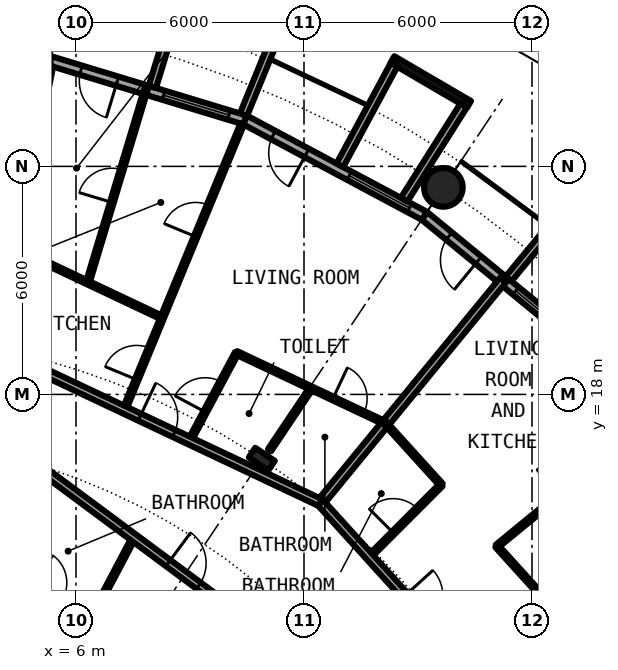
"""IFC4 building model, lengths in metres.
Left out: names, types, materials, properties, quantities, classifications, styles, units other than length and angle.
Written with IfcOpenShell. Run it as: python <this file> out.ifc"""

import sys

from ifc_helpers import new_model, si_unit, direction, frame, frame_2d, origin, origin_2d, place, context, subcontext, project, spatial, rectangle, circle, hollow_circle, i_section, extrude, element, fill, save


model = new_model("IFC4")
c1 = context("Model", 3, precision=1e-05, world=origin(), true_north=direction((0.0, 1.0)))
c2 = subcontext(c1, "Body", "Model", "MODEL_VIEW")
j1 = project(units=[si_unit("LENGTHUNIT", "METRE"), si_unit("PLANEANGLEUNIT", "RADIAN")], contexts=[c1])
p1 = place(None, origin())
s1 = spatial("IfcSite", under=j1, at=p1, CompositionType="ELEMENT")
p2 = place(p1, origin())
s2 = spatial("IfcBuilding", under=s1, at=p2, CompositionType="ELEMENT")
p3 = place(p2, frame((0.0, 0.0, 41.1)))
s3 = spatial("IfcBuildingStorey", under=s2, at=p3, CompositionType="ELEMENT", Elevation=41.1)
p4 = place(p3, frame((15.667, 23.448, 0.0), z_axis=(0.0, 0.0, 1.0), x_axis=(1.0, 0.0, 0.0)))
e1 = element("IfcColumn", 1, at=p4, inside=s3, PredefinedType="COLUMN", context=c2, shape_type="SweptSolid", body=[
    extrude(hollow_circle(Radius=0.508, WallThickness=0.05, at=origin_2d()), origin(), (0.0, 0.0, 1.0), 3.05),
])
p5 = place(p3, frame((10.889, 16.297, 0.0), z_axis=(0.0, 0.0, 1.0), x_axis=(0.55557023302, 0.831469612303, 0.0)))
e2 = element("IfcColumn", 2, at=p5, inside=s3, PredefinedType="COLUMN", context=c2, shape_type="SweptSolid", body=[
    extrude(i_section(OverallWidth=0.305, OverallDepth=0.62, WebThickness=0.021, FlangeThickness=0.04, FilletRadius=0.027, at=origin_2d()), origin(), (0.0, 0.0, 1.0), 3.05),
])
p6 = place(p3, frame((19.304, 19.304, 0.0), z_axis=(0.0, 0.0, 1.0), x_axis=(-0.773019449054, 0.634382322723, 0.0)))
e3 = element("IfcWall", 3, at=p6, inside=s3, PredefinedType="SOLIDWALL", context=c2, shape_type="SweptSolid", body=[
    extrude(rectangle(XDim=5.352, YDim=0.25, at=frame_2d((2.676, 0.0))), origin(), (0.0, 0.0, 1.0), 2.7),
])
p7 = place(p6, frame((0.441, 0.0, 0.3)))
e4 = element("IfcOpeningElement", 4, at=p7, cuts=e3, PredefinedType="OPENING", context=c2, shape_type="SweptSolid", body=[
    extrude(rectangle(XDim=1.8, YDim=2.1, at=frame_2d((0.9, 1.05))), frame((0.0, 0.135, 0.0), z_axis=(0.0, -1.0, 0.0), x_axis=(1.0, 0.0, 0.0)), (0.0, 0.0, 1.0), 0.27),
])
p8 = place(p6, frame((3.51, 0.0, 0.0)))
e5 = element("IfcOpeningElement", 5, at=p8, cuts=e3, PredefinedType="OPENING", context=c2, shape_type="SweptSolid", body=[
    extrude(rectangle(XDim=1.0, YDim=2.2, at=frame_2d((0.5, 1.1))), frame((0.0, 0.135, 0.0), z_axis=(0.0, -1.0, 0.0), x_axis=(1.0, 0.0, 0.0)), (0.0, 0.0, 1.0), 0.27),
])
p9 = place(p3, frame((17.384, 21.041, -0.03), z_axis=(0.0, 0.0, 1.0), x_axis=(0.63709551667, 0.770784861449, 0.0)))
e6 = element("IfcWall", 6, at=p9, inside=s3, PredefinedType="SOLIDWALL", context=c2, shape_type="SweptSolid", body=[
    extrude(rectangle(XDim=3.006, YDim=0.2, at=frame_2d((1.503, 0.0))), origin(), (0.0, 0.0, 1.0), 2.73),
])
p10 = place(p3, frame((15.167, 22.699, 0.0), z_axis=(0.0, 0.0, 1.0), x_axis=(-0.881915646801, 0.471407246368, 0.0)))
e7 = element("IfcWall", 7, at=p10, inside=s3, PredefinedType="SOLIDWALL", context=c2, shape_type="SweptSolid", body=[
    extrude(rectangle(XDim=5.352, YDim=0.25, at=frame_2d((2.676, 0.0))), origin(), (0.0, 0.0, 1.0), 2.7),
])
p11 = place(p10, frame((0.441, 0.0, 0.3)))
e8 = element("IfcOpeningElement", 8, at=p11, cuts=e7, PredefinedType="OPENING", context=c2, shape_type="SweptSolid", body=[
    extrude(rectangle(XDim=1.8, YDim=2.1, at=frame_2d((0.9, 1.05))), frame((0.0, 0.135, 0.0), z_axis=(0.0, -1.0, 0.0), x_axis=(1.0, 0.0, 0.0)), (0.0, 0.0, 1.0), 0.27),
])
p12 = place(p10, frame((3.51, 0.0, 0.0)))
e9 = element("IfcOpeningElement", 9, at=p12, cuts=e7, PredefinedType="OPENING", context=c2, shape_type="SweptSolid", body=[
    extrude(rectangle(XDim=1.0, YDim=2.2, at=frame_2d((0.5, 1.1))), frame((0.0, 0.135, 0.0), z_axis=(0.0, -1.0, 0.0), x_axis=(1.0, 0.0, 0.0)), (0.0, 0.0, 1.0), 0.27),
])
p13 = place(p3, frame((16.344, 25.633, -0.03), z_axis=(0.0, 0.0, 1.0), x_axis=(-0.863346521872, 0.504611517081, 0.0)))
e10 = element("IfcWall", 10, at=p13, inside=s3, PredefinedType="SOLIDWALL", context=c2, shape_type="SweptSolid", body=[
    extrude(rectangle(XDim=2.336, YDim=0.2, at=frame_2d((1.168, 0.0))), origin(), (0.0, 0.0, 1.0), 2.73),
])
p14 = place(p13, frame((0.128, 0.0, 0.33)))
e11 = element("IfcOpeningElement", 11, at=p14, cuts=e10, PredefinedType="OPENING", context=c2, shape_type="SweptSolid", body=[
    extrude(circle(Radius=1.04, at=frame_2d((1.04, 1.04))), frame((0.0, 0.11, 0.0), z_axis=(0.0, -1.0, 0.0), x_axis=(1.0, 0.0, 0.0)), (0.0, 0.0, 1.0), 0.22),
])
p15 = place(p3, frame((14.635, 23.126, -0.03), z_axis=(0.0, 0.0, 1.0), x_axis=(0.534437802731, 0.845207805816, 0.0)))
e12 = element("IfcWall", 12, at=p15, inside=s3, PredefinedType="SOLIDWALL", context=c2, shape_type="SweptSolid", body=[
    extrude(rectangle(XDim=2.932, YDim=0.2, at=frame_2d((1.466, 0.0))), origin(), (0.0, 0.0, 1.0), 2.73),
])
p16 = place(p3, frame((12.945, 24.029, -0.03), z_axis=(0.0, 0.0, 1.0), x_axis=(0.474424310775, 0.88029629861, 0.0)))
e13 = element("IfcWall", 13, at=p16, inside=s3, PredefinedType="SOLIDWALL", context=c2, shape_type="SweptSolid", body=[
    extrude(rectangle(XDim=3.006, YDim=0.2, at=frame_2d((1.503, 0.0))), origin(), (0.0, 0.0, 1.0), 2.73),
])
p17 = place(p3, frame((10.447, 25.222, 0.0), z_axis=(0.0, 0.0, 1.0), x_axis=(-0.956965678721, 0.290201119486, 0.0)))
e14 = element("IfcWall", 14, at=p17, inside=s3, PredefinedType="SOLIDWALL", context=c2, shape_type="SweptSolid", body=[
    extrude(rectangle(XDim=5.351, YDim=0.25, at=frame_2d((2.676, 0.0))), origin(), (0.0, 0.0, 1.0), 2.7),
])
p18 = place(p17, frame((0.441, 0.0, 0.3)))
e15 = element("IfcOpeningElement", 15, at=p18, cuts=e14, PredefinedType="OPENING", context=c2, shape_type="SweptSolid", body=[
    extrude(rectangle(XDim=1.8, YDim=2.1, at=frame_2d((0.9, 1.05))), frame((0.0, 0.135, 0.0), z_axis=(0.0, -1.0, 0.0), x_axis=(1.0, 0.0, 0.0)), (0.0, 0.0, 1.0), 0.27),
])
p19 = place(p17, frame((3.51, 0.0, 0.0)))
e16 = element("IfcOpeningElement", 16, at=p19, cuts=e14, PredefinedType="OPENING", context=c2, shape_type="SweptSolid", body=[
    extrude(rectangle(XDim=1.0, YDim=2.2, at=frame_2d((0.5, 1.1))), frame((0.0, 0.135, 0.0), z_axis=(0.0, -1.0, 0.0), x_axis=(1.0, 0.0, 0.0)), (0.0, 0.0, 1.0), 0.27),
])
p20 = place(p3, frame((10.409, 25.364, -0.03), z_axis=(0.0, 0.0, 1.0), x_axis=(0.379509886562, 0.925187681501, 0.0)))
e17 = element("IfcWall", 17, at=p20, inside=s3, PredefinedType="SOLIDWALL", context=c2, shape_type="SweptSolid", body=[
    extrude(rectangle(XDim=2.883, YDim=0.2, at=frame_2d((1.441, 0.0))), origin(), (0.0, 0.0, 1.0), 2.73),
])
p21 = place(p3, frame((8.009, 26.092, -0.03), z_axis=(0.0, 0.0, 1.0), x_axis=(0.293406695073, 0.955987715029, 0.0)))
e18 = element("IfcWall", 18, at=p21, inside=s3, PredefinedType="SOLIDWALL", context=c2, shape_type="SweptSolid", body=[
    extrude(rectangle(XDim=3.006, YDim=0.2, at=frame_2d((1.503, 0.0))), origin(), (0.0, 0.0, 1.0), 2.73),
])
p22 = place(p3, frame((3.885, 19.527, 0.0), z_axis=(0.0, 0.0, 1.0), x_axis=(0.19503038749, 0.980797200218, 0.0)))
e19 = element("IfcWall", 19, at=p22, inside=s3, PredefinedType="PARTITIONING", context=c2, shape_type="SweptSolid", body=[
    extrude(rectangle(XDim=7.265, YDim=0.2, at=frame_2d((3.633, 0.0))), origin(), (0.0, 0.0, 1.0), 2.7),
])
p23 = place(p3, frame((6.31, 20.945, 0.0), z_axis=(0.0, 0.0, 1.0), x_axis=(0.288484435279, 0.957484585047, 0.0)))
e20 = element("IfcWall", 20, at=p23, inside=s3, PredefinedType="PARTITIONING", context=c2, shape_type="SweptSolid", body=[
    extrude(rectangle(XDim=5.3, YDim=0.1, at=frame_2d((2.65, 0.0))), origin(), (0.0, 0.0, 1.0), 2.7),
])
p24 = place(p23, frame((2.2, 0.0, 0.0)))
e21 = element("IfcOpeningElement", 21, at=p24, cuts=e20, PredefinedType="OPENING", context=c2, shape_type="SweptSolid", body=[
    extrude(rectangle(XDim=0.9, YDim=2.3, at=frame_2d((0.45, 1.15))), frame((0.0, 0.06, 0.0), z_axis=(0.0, -1.0, 0.0), x_axis=(1.0, 0.0, 0.0)), (0.0, 0.0, 1.0), 0.12),
])
p25 = place(p3, frame((6.318, 11.96, 0.0), z_axis=(0.0, 0.0, 1.0), x_axis=(0.467001992543, 0.884256263173, 0.0)))
e22 = element("IfcWall", 22, at=p25, inside=s3, PredefinedType="PARTITIONING", context=c2, shape_type="SweptSolid", body=[
    extrude(rectangle(XDim=2.572, YDim=0.1, at=frame_2d((1.286, 0.0))), origin(), (0.0, 0.0, 1.0), 2.7),
])
p26 = place(p3, frame((7.268, 17.594, 0.0), z_axis=(0.0, 0.0, 1.0), x_axis=(0.381660983618, 0.924302382115, 0.0)))
e23 = element("IfcWall", 23, at=p26, inside=s3, PredefinedType="PARTITIONING", context=c2, shape_type="SweptSolid", body=[
    extrude(rectangle(XDim=8.138, YDim=0.1, at=frame_2d((4.069, 0.0))), origin(), (0.0, 0.0, 1.0), 2.7),
])
p27 = place(p26, frame((0.86, 0.0, 0.0)))
e24 = element("IfcOpeningElement", 24, at=p27, cuts=e23, PredefinedType="OPENING", context=c2, shape_type="SweptSolid", body=[
    extrude(rectangle(XDim=0.9, YDim=2.3, at=frame_2d((0.45, 1.15))), frame((0.0, 0.06, 0.0), z_axis=(0.0, -1.0, 0.0), x_axis=(1.0, 0.0, 0.0)), (0.0, 0.0, 1.0), 0.12),
])
p28 = place(p26, frame((4.93, 0.0, 0.0)))
e25 = element("IfcOpeningElement", 25, at=p28, cuts=e23, PredefinedType="OPENING", context=c2, shape_type="SweptSolid", body=[
    extrude(rectangle(XDim=0.9, YDim=2.3, at=frame_2d((0.45, 1.15))), frame((0.0, 0.06, 0.0), z_axis=(0.0, -1.0, 0.0), x_axis=(1.0, 0.0, 0.0)), (0.0, 0.0, 1.0), 0.12),
])
p29 = place(p3, frame((8.99, 16.78, 0.0), z_axis=(0.0, 0.0, 1.0), x_axis=(0.472216244249, 0.881482738723, 0.0)))
e26 = element("IfcWall", 26, at=p29, inside=s3, PredefinedType="PARTITIONING", context=c2, shape_type="SweptSolid", body=[
    extrude(rectangle(XDim=2.622, YDim=0.1, at=frame_2d((1.311, 0.0))), origin(), (0.0, 0.0, 1.0), 2.7),
])
p30 = place(p29, frame((0.861, 0.0, 0.0)))
e27 = element("IfcOpeningElement", 27, at=p30, cuts=e26, PredefinedType="OPENING", context=c2, shape_type="SweptSolid", body=[
    extrude(rectangle(XDim=0.9, YDim=2.3, at=frame_2d((0.45, 1.15))), frame((0.0, 0.06, 0.0), z_axis=(0.0, -1.0, 0.0), x_axis=(1.0, 0.0, 0.0)), (0.0, 0.0, 1.0), 0.12),
])
p31 = place(p3, frame((11.093, 16.533, 0.0), z_axis=(0.0, 0.0, 1.0), x_axis=(0.557134474719, 0.830422288405, 0.0)))
e28 = element("IfcWall", 28, at=p31, inside=s3, PredefinedType="PARTITIONING", context=c2, shape_type="SweptSolid", body=[
    extrude(rectangle(XDim=1.965, YDim=0.1, at=frame_2d((0.983, 0.0))), origin(), (0.0, 0.0, 1.0), 2.7),
])
p32 = place(p3, frame((12.432, 15.152, 0.0), z_axis=(0.0, 0.0, 1.0), x_axis=(0.634353152115, 0.77304338714, 0.0)))
e29 = element("IfcWall", 29, at=p32, inside=s3, PredefinedType="PARTITIONING", context=c2, shape_type="SweptSolid", body=[
    extrude(rectangle(XDim=7.576, YDim=0.2, at=frame_2d((3.788, 0.0))), origin(), (0.0, 0.0, 1.0), 2.7),
])
p33 = place(p3, frame((13.722, 13.73, 0.0), z_axis=(0.0, 0.0, 1.0), x_axis=(0.706741540154, 0.707471833659, 0.0)))
e30 = element("IfcWall", 30, at=p33, inside=s3, PredefinedType="PARTITIONING", context=c2, shape_type="SweptSolid", body=[
    extrude(rectangle(XDim=2.674, YDim=0.1, at=frame_2d((1.337, 0.0))), origin(), (0.0, 0.0, 1.0), 2.7),
])
p34 = place(p33, frame((0.887, 0.0, 0.0)))
e31 = element("IfcOpeningElement", 31, at=p34, cuts=e30, PredefinedType="OPENING", context=c2, shape_type="SweptSolid", body=[
    extrude(rectangle(XDim=0.9, YDim=2.3, at=frame_2d((0.45, 1.15))), frame((0.0, 0.06, 0.0), z_axis=(0.0, -1.0, 0.0), x_axis=(1.0, 0.0, 0.0)), (0.0, 0.0, 1.0), 0.12),
])
p35 = place(p3, frame((17.077, 14.006, 0.0), z_axis=(0.0, 0.0, 1.0), x_axis=(0.77326214499, 0.634086472908, 0.0)))
e32 = element("IfcWall", 32, at=p35, inside=s3, PredefinedType="PARTITIONING", context=c2, shape_type="SweptSolid", body=[
    extrude(rectangle(XDim=5.089, YDim=0.1, at=frame_2d((2.544, 0.0))), origin(), (0.0, 0.0, 1.0), 2.7),
])
p36 = place(p35, frame((2.094, 0.0, 0.0)))
e33 = element("IfcOpeningElement", 33, at=p36, cuts=e32, PredefinedType="OPENING", context=c2, shape_type="SweptSolid", body=[
    extrude(rectangle(XDim=0.9, YDim=2.3, at=frame_2d((0.45, 1.15))), frame((0.0, 0.06, 0.0), z_axis=(0.0, -1.0, 0.0), x_axis=(1.0, 0.0, 0.0)), (0.0, 0.0, 1.0), 0.12),
])
p37 = place(p3, frame((4.122, 13.589, 0.0), z_axis=(0.0, 0.0, 1.0), x_axis=(0.803128348509, -0.595806055542, 0.0)))
e34 = element("IfcWall", 34, at=p37, inside=s3, PredefinedType="PARTITIONING", context=c2, shape_type="SweptSolid", body=[
    extrude(rectangle(XDim=2.734, YDim=0.1, at=frame_2d((1.367, 0.0))), origin(), (0.0, 0.0, 1.0), 2.7),
])
p38 = place(p37, frame((0.917, 0.0, 0.0)))
e35 = element("IfcOpeningElement", 35, at=p38, cuts=e34, PredefinedType="OPENING", context=c2, shape_type="SweptSolid", body=[
    extrude(rectangle(XDim=0.9, YDim=2.3, at=frame_2d((0.45, 1.15))), frame((0.0, 0.06, 0.0), z_axis=(0.0, -1.0, 0.0), x_axis=(1.0, 0.0, 0.0)), (0.0, 0.0, 1.0), 0.12),
])
p39 = place(p3, frame((4.906, 16.172, 0.0), z_axis=(0.0, 0.0, 1.0), x_axis=(0.803202106898, -0.595706618626, 0.0)))
e36 = element("IfcWall", 36, at=p39, inside=s3, PredefinedType="PARTITIONING", context=c2, shape_type="SweptSolid", body=[
    extrude(rectangle(XDim=11.368, YDim=0.2, at=frame_2d((5.684, 0.0))), origin(), (0.0, 0.0, 1.0), 2.7),
])
p40 = place(p39, frame((4.38, 0.0, 0.0)))
e37 = element("IfcOpeningElement", 37, at=p40, cuts=e36, PredefinedType="OPENING", context=c2, shape_type="SweptSolid", body=[
    extrude(rectangle(XDim=1.0, YDim=2.3, at=frame_2d((0.5, 1.15))), frame((0.0, 0.11, 0.0), z_axis=(0.0, -1.0, 0.0), x_axis=(1.0, 0.0, 0.0)), (0.0, 0.0, 1.0), 0.22),
])
p41 = place(p3, frame((3.966, 19.154, 0.0), z_axis=(0.0, 0.0, 1.0), x_axis=(0.904067688688, -0.427389300603, 0.0)))
e38 = element("IfcWall", 38, at=p41, inside=s3, PredefinedType="PARTITIONING", context=c2, shape_type="SweptSolid", body=[
    extrude(rectangle(XDim=9.366, YDim=0.2, at=frame_2d((4.683, 0.0))), origin(), (0.0, 0.0, 1.0), 2.38),
])
p42 = place(p41, frame((4.104, 0.0, 0.0)))
e39 = element("IfcOpeningElement", 39, at=p42, cuts=e38, PredefinedType="OPENING", context=c2, shape_type="SweptSolid", body=[
    extrude(rectangle(XDim=1.0, YDim=2.3, at=frame_2d((0.5, 1.15))), frame((0.0, 0.11, 0.0), z_axis=(0.0, -1.0, 0.0), x_axis=(1.0, 0.0, 0.0)), (0.0, 0.0, 1.0), 0.22),
])
p43 = place(p3, frame((12.434, 15.151, 0.0), z_axis=(0.0, 0.0, 1.0), x_axis=(0.671514934772, -0.740991020444, 0.0)))
e40 = element("IfcWall", 40, at=p43, inside=s3, PredefinedType="PARTITIONING", context=c2, shape_type="SweptSolid", body=[
    extrude(rectangle(XDim=5.598, YDim=0.2, at=frame_2d((2.799, 0.0))), origin(), (0.0, 0.0, 1.0), 2.38),
])
p44 = place(p43, frame((3.305, 0.0, 0.0)))
e41 = element("IfcOpeningElement", 41, at=p44, cuts=e40, PredefinedType="OPENING", context=c2, shape_type="SweptSolid", body=[
    extrude(rectangle(XDim=1.0, YDim=2.3, at=frame_2d((0.5, 1.15))), frame((0.0, 0.11, 0.0), z_axis=(0.0, -1.0, 0.0), x_axis=(1.0, 0.0, 0.0)), (0.0, 0.0, 1.0), 0.22),
])
p45 = place(p3, frame((4.337, 21.874, 0.0), z_axis=(0.0, 0.0, 1.0), x_axis=(0.904130816667, -0.427255738818, 0.0)))
e42 = element("IfcWall", 42, at=p45, inside=s3, PredefinedType="PARTITIONING", context=c2, shape_type="SweptSolid", body=[
    extrude(rectangle(XDim=4.335, YDim=0.1, at=frame_2d((2.167, 0.0))), origin(), (0.0, 0.0, 1.0), 2.7),
])
p46 = place(p3, frame((10.222, 19.094, 0.0), z_axis=(0.0, 0.0, 1.0), x_axis=(0.904171929575, -0.427168727518, 0.0)))
e43 = element("IfcWall", 43, at=p46, inside=s3, PredefinedType="PARTITIONING", context=c2, shape_type="SweptSolid", body=[
    extrude(rectangle(XDim=4.336, YDim=0.1, at=frame_2d((2.168, 0.0))), origin(), (0.0, 0.0, 1.0), 2.7),
])
p47 = place(p46, frame((2.808, 0.0, 0.0)))
e44 = element("IfcOpeningElement", 44, at=p47, cuts=e43, PredefinedType="OPENING", context=c2, shape_type="SweptSolid", body=[
    extrude(rectangle(XDim=0.9, YDim=2.3, at=frame_2d((0.45, 1.15))), frame((0.0, 0.06, 0.0), z_axis=(0.0, -1.0, 0.0), x_axis=(1.0, 0.0, 0.0)), (0.0, 0.0, 1.0), 0.12),
])
p48 = place(p3, frame((14.147, 17.238, 0.0), z_axis=(0.0, 0.0, 1.0), x_axis=(0.671674967707, -0.740845960882, 0.0)))
e45 = element("IfcWall", 45, at=p48, inside=s3, PredefinedType="PARTITIONING", context=c2, shape_type="SweptSolid", body=[
    extrude(rectangle(XDim=2.181, YDim=0.1, at=frame_2d((1.091, 0.0))), origin(), (0.0, 0.0, 1.0), 2.7),
])
p49 = place(p3, frame((17.072, 14.011, 0.0), z_axis=(0.0, 0.0, 1.0), x_axis=(0.67169789574, -0.740825172937, 0.0)))
e46 = element("IfcWall", 46, at=p49, inside=s3, PredefinedType="PARTITIONING", context=c2, shape_type="SweptSolid", body=[
    extrude(rectangle(XDim=2.183, YDim=0.1, at=frame_2d((1.091, 0.0))), origin(), (0.0, 0.0, 1.0), 2.7),
])
p50 = place(p7, origin())
e47 = element("IfcWindow", 47, at=p50, inside=s3, PartitioningType="SINGLE_PANEL", PredefinedType="WINDOW", context=c2, shape_type="SweptSolid", body=[
    extrude(rectangle(XDim=1.8, YDim=2.1, at=frame_2d((0.9, 1.05))), frame((0.0, 0.03, 0.0), z_axis=(0.0, -1.0, 0.0), x_axis=(1.0, 0.0, 0.0)), (0.0, 0.0, 1.0), 0.06),
])
fill(e4, e47)
p51 = place(p8, origin())
e48 = element("IfcDoor", 48, at=p51, inside=s3, OperationType="SINGLE_SWING_LEFT", PredefinedType="DOOR", context=c2, shape_type="SweptSolid", body=[
    extrude(rectangle(XDim=1.0, YDim=2.2, at=frame_2d((0.5, 1.1))), frame((0.0, 0.025, 0.0), z_axis=(0.0, -1.0, 0.0), x_axis=(1.0, 0.0, 0.0)), (0.0, 0.0, 1.0), 0.05),
])
fill(e5, e48)
p52 = place(p11, origin())
e49 = element("IfcWindow", 49, at=p52, inside=s3, PartitioningType="SINGLE_PANEL", PredefinedType="WINDOW", context=c2, shape_type="SweptSolid", body=[
    extrude(rectangle(XDim=1.8, YDim=2.1, at=frame_2d((0.9, 1.05))), frame((0.0, 0.03, 0.0), z_axis=(0.0, -1.0, 0.0), x_axis=(1.0, 0.0, 0.0)), (0.0, 0.0, 1.0), 0.06),
])
fill(e8, e49)
p53 = place(p14, origin())
e50 = element("IfcWindow", 50, at=p53, inside=s3, PartitioningType="SINGLE_PANEL", PredefinedType="WINDOW", context=c2, shape_type="SweptSolid", body=[
    extrude(circle(Radius=1.04, at=frame_2d((1.04, 1.04))), frame((0.0, 0.03, 0.0), z_axis=(0.0, -1.0, 0.0), x_axis=(1.0, 0.0, 0.0)), (0.0, 0.0, 1.0), 0.06),
])
fill(e11, e50)
p54 = place(p12, origin())
e51 = element("IfcDoor", 51, at=p54, inside=s3, OperationType="SINGLE_SWING_LEFT", PredefinedType="DOOR", context=c2, shape_type="SweptSolid", body=[
    extrude(rectangle(XDim=1.0, YDim=2.2, at=frame_2d((0.5, 1.1))), frame((0.0, 0.025, 0.0), z_axis=(0.0, -1.0, 0.0), x_axis=(1.0, 0.0, 0.0)), (0.0, 0.0, 1.0), 0.05),
])
fill(e9, e51)
p55 = place(p18, origin())
e52 = element("IfcWindow", 52, at=p55, inside=s3, PartitioningType="SINGLE_PANEL", PredefinedType="WINDOW", context=c2, shape_type="SweptSolid", body=[
    extrude(rectangle(XDim=1.8, YDim=2.1, at=frame_2d((0.9, 1.05))), frame((0.0, 0.03, 0.0), z_axis=(0.0, -1.0, 0.0), x_axis=(1.0, 0.0, 0.0)), (0.0, 0.0, 1.0), 0.06),
])
fill(e15, e52)
p56 = place(p19, origin())
e53 = element("IfcDoor", 53, at=p56, inside=s3, OperationType="SINGLE_SWING_LEFT", PredefinedType="DOOR", context=c2, shape_type="SweptSolid", body=[
    extrude(rectangle(XDim=1.0, YDim=2.2, at=frame_2d((0.5, 1.1))), frame((0.0, 0.025, 0.0), z_axis=(0.0, -1.0, 0.0), x_axis=(1.0, 0.0, 0.0)), (0.0, 0.0, 1.0), 0.05),
])
fill(e16, e53)
p57 = place(p34, origin())
e54 = element("IfcDoor", 54, at=p57, inside=s3, OperationType="SINGLE_SWING_RIGHT", PredefinedType="DOOR", context=c2, shape_type="SweptSolid", body=[
    extrude(rectangle(XDim=0.9, YDim=2.3, at=frame_2d((0.45, 1.15))), frame((0.0, 0.025, 0.0), z_axis=(0.0, -1.0, 0.0), x_axis=(1.0, 0.0, 0.0)), (0.0, 0.0, 1.0), 0.05),
])
fill(e31, e54)
p58 = place(p42, origin())
e55 = element("IfcDoor", 55, at=p58, inside=s3, OperationType="SINGLE_SWING_LEFT", PredefinedType="DOOR", context=c2, shape_type="SweptSolid", body=[
    extrude(rectangle(XDim=1.0, YDim=2.3, at=frame_2d((0.5, 1.15))), frame((0.0, 0.025, 0.0), z_axis=(0.0, -1.0, 0.0), x_axis=(1.0, 0.0, 0.0)), (0.0, 0.0, 1.0), 0.05),
])
fill(e39, e55)
p59 = place(p47, origin())
e56 = element("IfcDoor", 56, at=p59, inside=s3, OperationType="SINGLE_SWING_RIGHT", PredefinedType="DOOR", context=c2, shape_type="SweptSolid", body=[
    extrude(rectangle(XDim=0.9, YDim=2.3, at=frame_2d((0.45, 1.15))), frame((0.0, 0.025, 0.0), z_axis=(0.0, -1.0, 0.0), x_axis=(1.0, 0.0, 0.0)), (0.0, 0.0, 1.0), 0.05),
])
fill(e44, e56)
p60 = place(p30, origin())
e57 = element("IfcDoor", 57, at=p60, inside=s3, OperationType="SINGLE_SWING_RIGHT", PredefinedType="DOOR", context=c2, shape_type="SweptSolid", body=[
    extrude(rectangle(XDim=0.9, YDim=2.3, at=frame_2d((0.45, 1.15))), frame((0.0, 0.025, 0.0), z_axis=(0.0, -1.0, 0.0), x_axis=(1.0, 0.0, 0.0)), (0.0, 0.0, 1.0), 0.05),
])
fill(e27, e57)
p61 = place(p27, origin())
e58 = element("IfcDoor", 58, at=p61, inside=s3, OperationType="SINGLE_SWING_LEFT", PredefinedType="DOOR", context=c2, shape_type="SweptSolid", body=[
    extrude(rectangle(XDim=0.9, YDim=2.3, at=frame_2d((0.45, 1.15))), frame((0.0, 0.025, 0.0), z_axis=(0.0, -1.0, 0.0), x_axis=(1.0, 0.0, 0.0)), (0.0, 0.0, 1.0), 0.05),
])
fill(e24, e58)
p62 = place(p28, origin())
e59 = element("IfcDoor", 59, at=p62, inside=s3, OperationType="SINGLE_SWING_RIGHT", PredefinedType="DOOR", context=c2, shape_type="SweptSolid", body=[
    extrude(rectangle(XDim=0.9, YDim=2.3, at=frame_2d((0.45, 1.15))), frame((0.0, 0.025, 0.0), z_axis=(0.0, -1.0, 0.0), x_axis=(1.0, 0.0, 0.0)), (0.0, 0.0, 1.0), 0.05),
])
fill(e25, e59)
p63 = place(p24, origin())
e60 = element("IfcDoor", 60, at=p63, inside=s3, OperationType="SINGLE_SWING_RIGHT", PredefinedType="DOOR", context=c2, shape_type="SweptSolid", body=[
    extrude(rectangle(XDim=0.9, YDim=2.3, at=frame_2d((0.45, 1.15))), frame((0.0, 0.025, 0.0), z_axis=(0.0, -1.0, 0.0), x_axis=(1.0, 0.0, 0.0)), (0.0, 0.0, 1.0), 0.05),
])
fill(e21, e60)
p64 = place(p40, origin())
e61 = element("IfcDoor", 61, at=p64, inside=s3, OperationType="SINGLE_SWING_LEFT", PredefinedType="DOOR", context=c2, shape_type="SweptSolid", body=[
    extrude(rectangle(XDim=1.0, YDim=2.3, at=frame_2d((0.5, 1.15))), frame((0.0, 0.025, 0.0), z_axis=(0.0, -1.0, 0.0), x_axis=(1.0, 0.0, 0.0)), (0.0, 0.0, 1.0), 0.05),
])
fill(e37, e61)
p65 = place(p38, origin())
e62 = element("IfcDoor", 62, at=p65, inside=s3, OperationType="SINGLE_SWING_LEFT", PredefinedType="DOOR", context=c2, shape_type="SweptSolid", body=[
    extrude(rectangle(XDim=0.9, YDim=2.3, at=frame_2d((0.45, 1.15))), frame((0.0, 0.025, 0.0), z_axis=(0.0, -1.0, 0.0), x_axis=(1.0, 0.0, 0.0)), (0.0, 0.0, 1.0), 0.05),
])
fill(e35, e62)
save(model, sys.argv[1])
